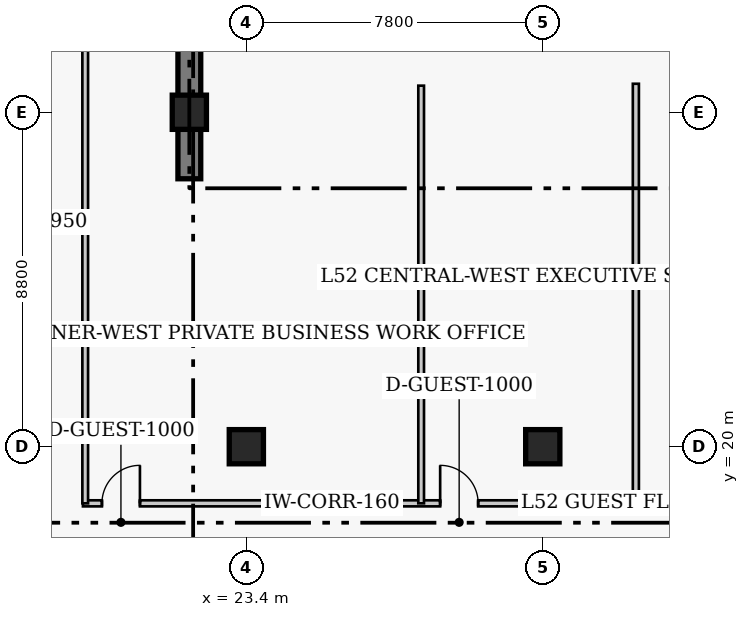
"""IFC4 building model, lengths in metres.
Left out: names, types, materials, properties, quantities, classifications, styles, units other than length and angle.
Written with IfcOpenShell. Run it as: python <this file> out.ifc"""

import sys

from ifc_helpers import new_model, si_unit, direction, frame, frame_2d, origin, origin_2d, place, context, subcontext, project, spatial, rectangle, extrude, element, fill, save


model = new_model("IFC4")
c1 = context("Model", 3, precision=1e-05, world=origin(), true_north=direction((0.0, 1.0)))
c2 = subcontext(c1, "Body", "Model", "MODEL_VIEW")
j1 = project(units=[si_unit("LENGTHUNIT", "METRE"), si_unit("PLANEANGLEUNIT", "RADIAN")], contexts=[c1])
p1 = place(None, origin())
s1 = spatial("IfcSite", under=j1, at=p1, CompositionType="ELEMENT")
p2 = place(p1, origin())
s2 = spatial("IfcBuilding", under=s1, at=p2, CompositionType="ELEMENT")
p3 = place(p2, frame((0.0, 0.0, 208.5)))
s3 = spatial("IfcBuildingStorey", under=s2, at=p3, CompositionType="ELEMENT", Elevation=208.5)
p4 = place(p3, frame((21.9, 27.05, 0.0), z_axis=(0.0, 0.0, 1.0), x_axis=(0.0, 1.0, 0.0)))
e1 = element("IfcWall", 1, at=p4, inside=s3, PredefinedType="SHEAR", context=c2, shape_type="SweptSolid", body=[
    extrude(rectangle(XDim=13.57, YDim=0.6, at=frame_2d((6.785, 0.0))), origin(), (0.0, 0.0, 1.0), 3.9),
])
for number, where, z_axis, x_axis in (
    (2, (23.4, 20.0, 0.0), (0.0, 0.0, 1.0), (1.0, 0.0, 0.0)),
    (3, (31.2, 20.0, 0.0), (0.0, 0.0, 1.0), (1.0, 0.0, 0.0)),
    (4, (21.9, 28.8, 0.0), (0.0, 0.0, 1.0), (1.0, 0.0, 0.0)),
):
    element("IfcColumn", number, at=place(p3, frame(where, z_axis=z_axis, x_axis=x_axis)), inside=s3, PredefinedType="COLUMN", context=c2, shape_type="SweptSolid", body=[
        extrude(rectangle(XDim=0.9, YDim=0.9, at=origin_2d()), origin(), (0.0, 0.0, 1.0), 3.9),
    ])
p5 = place(p3, frame((19.1, 18.51, 0.0), z_axis=(0.0, 0.0, 1.0), x_axis=(1.0, 0.0, 0.0)))
e5 = element("IfcWall", 5, at=p5, inside=s3, PredefinedType="PARTITIONING", context=c2, shape_type="SweptSolid", body=[
    extrude(rectangle(XDim=14.55, YDim=0.16, at=frame_2d((7.275, 0.0))), origin(), (0.0, 0.0, 1.0), 3.65),
])
p6 = place(p5, frame((0.5, 0.0, 0.0)))
e6 = element("IfcOpeningElement", 6, at=p6, cuts=e5, PredefinedType="OPENING", context=c2, shape_type="SweptSolid", body=[
    extrude(rectangle(XDim=1.0, YDim=2.15, at=frame_2d((0.5, 1.075))), frame((0.0, 0.09, 0.0), z_axis=(0.0, -1.0, 0.0), x_axis=(1.0, 0.0, 0.0)), (0.0, 0.0, 1.0), 0.18),
])
p7 = place(p5, frame((9.4, 0.0, 0.0)))
e7 = element("IfcOpeningElement", 7, at=p7, cuts=e5, PredefinedType="OPENING", context=c2, shape_type="SweptSolid", body=[
    extrude(rectangle(XDim=1.0, YDim=2.15, at=frame_2d((0.5, 1.075))), frame((0.0, 0.09, 0.0), z_axis=(0.0, -1.0, 0.0), x_axis=(1.0, 0.0, 0.0)), (0.0, 0.0, 1.0), 0.18),
])
p8 = place(p3, frame((33.65, 18.51, 0.0), z_axis=(0.0, 0.0, 1.0), x_axis=(0.0, 1.0, 0.0)))
e8 = element("IfcWall", 8, at=p8, inside=s3, PredefinedType="PARTITIONING", context=c2, shape_type="SweptSolid", body=[
    extrude(rectangle(XDim=11.04, YDim=0.16, at=frame_2d((5.52, 0.0))), origin(), (0.0, 0.0, 1.0), 3.65),
])
p9 = place(p3, frame((19.16, 18.51, 0.0), z_axis=(0.0, 0.0, 1.0), x_axis=(0.0, 1.0, 0.0)))
e9 = element("IfcWall", 9, at=p9, inside=s3, PredefinedType="PARTITIONING", context=c2, shape_type="SweptSolid", body=[
    extrude(rectangle(XDim=14.29, YDim=0.15, at=frame_2d((7.145, 0.0))), origin(), (0.0, 0.0, 1.0), 3.65),
])
p10 = place(p3, frame((28.0, 18.51, 0.0), z_axis=(0.0, 0.0, 1.0), x_axis=(0.0, 1.0, 0.0)))
e10 = element("IfcWall", 10, at=p10, inside=s3, PredefinedType="PARTITIONING", context=c2, shape_type="SweptSolid", body=[
    extrude(rectangle(XDim=10.99, YDim=0.15, at=frame_2d((5.495, 0.0))), origin(), (0.0, 0.0, 1.0), 3.65),
])
p11 = place(p6, origin())
e11 = element("IfcDoor", 11, at=p11, inside=s3, OperationType="SINGLE_SWING_RIGHT", PredefinedType="DOOR", context=c2, shape_type="SweptSolid", body=[
    extrude(rectangle(XDim=1.0, YDim=2.15, at=frame_2d((0.5, 1.075))), frame((0.0, 0.025, 0.0), z_axis=(0.0, -1.0, 0.0), x_axis=(1.0, 0.0, 0.0)), (0.0, 0.0, 1.0), 0.05),
])
fill(e6, e11)
p12 = place(p7, origin())
e12 = element("IfcDoor", 12, at=p12, inside=s3, OperationType="SINGLE_SWING_LEFT", PredefinedType="DOOR", context=c2, shape_type="SweptSolid", body=[
    extrude(rectangle(XDim=1.0, YDim=2.15, at=frame_2d((0.5, 1.075))), frame((0.0, 0.025, 0.0), z_axis=(0.0, -1.0, 0.0), x_axis=(1.0, 0.0, 0.0)), (0.0, 0.0, 1.0), 0.05),
])
fill(e7, e12)
save(model, sys.argv[1])
